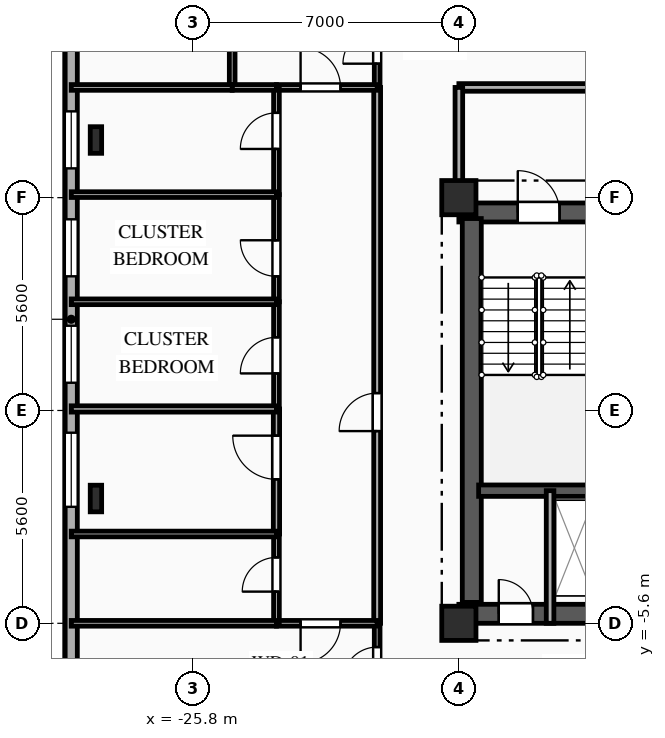
"""IFC4 building model, lengths in metres.
Left out: names, types, materials, properties, quantities, classifications, styles, units other than length and angle.
Written with IfcOpenShell. Run it as: python <this file> out.ifc"""

import sys

from ifc_helpers import new_model, si_unit, direction, frame, frame_2d, origin, origin_2d, place, context, subcontext, project, spatial, rectangle, i_section, extrude, element, fill, save


model = new_model("IFC4")
c1 = context("Model", 3, precision=1e-05, world=origin(), true_north=direction((0.0, 1.0)))
c2 = subcontext(c1, "Body", "Model", "MODEL_VIEW")
j1 = project(units=[si_unit("LENGTHUNIT", "METRE"), si_unit("PLANEANGLEUNIT", "RADIAN")], contexts=[c1])
p1 = place(None, origin())
s1 = spatial("IfcSite", under=j1, at=p1, CompositionType="ELEMENT")
p2 = place(p1, origin())
s2 = spatial("IfcBuilding", under=s1, at=p2, CompositionType="ELEMENT")
p3 = place(p2, frame((0.0, 0.0, 171.2)))
s3 = spatial("IfcBuildingStorey", under=s2, at=p3, CompositionType="ELEMENT", Elevation=171.2)
for number, where, z_axis, x_axis in (
    (1, (-18.8, -5.6, 0.0), (0.0, 0.0, 1.0), (1.0, 0.0, 0.0)),
    (2, (-18.8, 5.6, 0.0), (0.0, 0.0, 1.0), (1.0, 0.0, 0.0)),
):
    element("IfcColumn", number, at=place(p3, frame(where, z_axis=z_axis, x_axis=x_axis)), inside=s3, PredefinedType="COLUMN", context=c2, shape_type="SweptSolid", body=[
        extrude(rectangle(XDim=0.9, YDim=0.9, at=origin_2d()), origin(), (0.0, 0.0, 1.0), 3.35),
    ])
for number, where, z_axis, x_axis in (
    (3, (-28.35, 7.117, 0.0), (0.0, 0.0, 1.0), (1.0, 0.0, 0.0)),
    (4, (-28.35, -2.317, 0.0), (0.0, 0.0, 1.0), (1.0, 0.0, 0.0)),
):
    element("IfcColumn", number, at=place(p3, frame(where, z_axis=z_axis, x_axis=x_axis)), inside=s3, PredefinedType="COLUMN", context=c2, shape_type="SweptSolid", body=[
        extrude(i_section(OverallWidth=0.3, OverallDepth=0.7, WebThickness=0.017, FlangeThickness=0.032, FilletRadius=0.027, at=origin_2d()), origin(), (0.0, 0.0, 1.0), 3.35),
    ])
p4 = place(p3, frame((-29.0, -12.4, 0.0), z_axis=(0.0, 0.0, 1.0), x_axis=(0.0, 1.0, 0.0)))
e5 = element("IfcWall", 5, at=p4, inside=s3, PredefinedType="SOLIDWALL", context=c2, shape_type="SweptSolid", body=[
    extrude(rectangle(XDim=29.6, YDim=0.32, at=frame_2d((14.8, 0.0))), origin(), (0.0, 0.0, 1.0), 3.0),
])
p5 = place(p4, frame((2.855, 0.0, 0.85)))
e6 = element("IfcOpeningElement", 6, at=p5, cuts=e5, PredefinedType="OPENING", context=c2, shape_type="SweptSolid", body=[
    extrude(rectangle(XDim=1.65, YDim=1.85, at=frame_2d((0.825, 0.925))), frame((0.0, 0.17, 0.0), z_axis=(0.0, -1.0, 0.0), x_axis=(1.0, 0.0, 0.0)), (0.0, 0.0, 1.0), 0.34),
])
p6 = place(p4, frame((9.865, 0.0, 0.85)))
e7 = element("IfcOpeningElement", 7, at=p6, cuts=e5, PredefinedType="OPENING", context=c2, shape_type="SweptSolid", body=[
    extrude(rectangle(XDim=1.95, YDim=1.85, at=frame_2d((0.975, 0.925))), frame((0.0, 0.17, 0.0), z_axis=(0.0, -1.0, 0.0), x_axis=(1.0, 0.0, 0.0)), (0.0, 0.0, 1.0), 0.34),
])
p7 = place(p4, frame((13.13, 0.0, 0.85)))
e8 = element("IfcOpeningElement", 8, at=p7, cuts=e5, PredefinedType="OPENING", context=c2, shape_type="SweptSolid", body=[
    extrude(rectangle(XDim=1.5, YDim=1.85, at=frame_2d((0.75, 0.925))), frame((0.0, 0.17, 0.0), z_axis=(0.0, -1.0, 0.0), x_axis=(1.0, 0.0, 0.0)), (0.0, 0.0, 1.0), 0.34),
])
p8 = place(p4, frame((15.93, 0.0, 0.85)))
e9 = element("IfcOpeningElement", 9, at=p8, cuts=e5, PredefinedType="OPENING", context=c2, shape_type="SweptSolid", body=[
    extrude(rectangle(XDim=1.5, YDim=1.85, at=frame_2d((0.75, 0.925))), frame((0.0, 0.17, 0.0), z_axis=(0.0, -1.0, 0.0), x_axis=(1.0, 0.0, 0.0)), (0.0, 0.0, 1.0), 0.34),
])
p9 = place(p4, frame((18.77, 0.0, 0.85)))
e10 = element("IfcOpeningElement", 10, at=p9, cuts=e5, PredefinedType="OPENING", context=c2, shape_type="SweptSolid", body=[
    extrude(rectangle(XDim=1.5, YDim=1.85, at=frame_2d((0.75, 0.925))), frame((0.0, 0.17, 0.0), z_axis=(0.0, -1.0, 0.0), x_axis=(1.0, 0.0, 0.0)), (0.0, 0.0, 1.0), 0.34),
])
p10 = place(p4, frame((24.255, 0.0, 0.85)))
e11 = element("IfcOpeningElement", 11, at=p10, cuts=e5, PredefinedType="OPENING", context=c2, shape_type="SweptSolid", body=[
    extrude(rectangle(XDim=1.65, YDim=1.85, at=frame_2d((0.825, 0.925))), frame((0.0, 0.17, 0.0), z_axis=(0.0, -1.0, 0.0), x_axis=(1.0, 0.0, 0.0)), (0.0, 0.0, 1.0), 0.34),
])
p11 = place(p3, frame((-18.8, 5.21, 0.0), z_axis=(0.0, 0.0, 1.0), x_axis=(1.0, 0.0, 0.0)))
e12 = element("IfcWall", 12, at=p11, inside=s3, PredefinedType="SHEAR", context=c2, shape_type="SweptSolid", body=[
    extrude(rectangle(XDim=9.6, YDim=0.5, at=frame_2d((4.8, 0.0))), origin(), (0.0, 0.0, 1.0), 3.0),
])
p12 = place(p11, frame((1.55, 0.0, 0.0)))
e13 = element("IfcOpeningElement", 13, at=p12, cuts=e12, PredefinedType="OPENING", context=c2, shape_type="SweptSolid", body=[
    extrude(rectangle(XDim=1.1, YDim=2.15, at=frame_2d((0.55, 1.075))), frame((0.0, 0.26, 0.0), z_axis=(0.0, -1.0, 0.0), x_axis=(1.0, 0.0, 0.0)), (0.0, 0.0, 1.0), 0.52),
])
p13 = place(p11, frame((4.775, 0.0, 0.0)))
e14 = element("IfcOpeningElement", 14, at=p13, cuts=e12, PredefinedType="OPENING", context=c2, shape_type="SweptSolid", body=[
    extrude(rectangle(XDim=1.05, YDim=2.1, at=frame_2d((0.525, 1.05))), frame((0.0, 0.26, 0.0), z_axis=(0.0, -1.0, 0.0), x_axis=(1.0, 0.0, 0.0)), (0.0, 0.0, 1.0), 0.52),
])
p14 = place(p3, frame((-18.8, -5.35, 0.0), z_axis=(0.0, 0.0, 1.0), x_axis=(1.0, 0.0, 0.0)))
e15 = element("IfcWall", 15, at=p14, inside=s3, PredefinedType="SHEAR", context=c2, shape_type="SweptSolid", body=[
    extrude(rectangle(XDim=9.6, YDim=0.5, at=frame_2d((4.8, 0.0))), origin(), (0.0, 0.0, 1.0), 3.0),
])
p15 = place(p14, frame((1.05, 0.0, 0.0)))
e16 = element("IfcOpeningElement", 16, at=p15, cuts=e15, PredefinedType="OPENING", context=c2, shape_type="SweptSolid", body=[
    extrude(rectangle(XDim=0.9, YDim=2.1, at=frame_2d((0.45, 1.05))), frame((0.0, 0.26, 0.0), z_axis=(0.0, -1.0, 0.0), x_axis=(1.0, 0.0, 0.0)), (0.0, 0.0, 1.0), 0.52),
])
p16 = place(p3, frame((-18.46, -5.05, 0.0), z_axis=(0.0, 0.0, 1.0), x_axis=(0.0, 1.0, 0.0)))
e17 = element("IfcWall", 17, at=p16, inside=s3, PredefinedType="SHEAR", context=c2, shape_type="SweptSolid", body=[
    extrude(rectangle(XDim=10.1, YDim=0.5, at=frame_2d((5.05, 0.0))), origin(), (0.0, 0.0, 1.0), 3.0),
])
p17 = place(p3, frame((-18.28, -2.11, 0.0), z_axis=(0.0, 0.0, 1.0), x_axis=(1.0, 0.0, 0.0)))
e18 = element("IfcWall", 18, at=p17, inside=s3, PredefinedType="SHEAR", context=c2, shape_type="SweptSolid", body=[
    extrude(rectangle(XDim=3.18, YDim=0.3, at=frame_2d((1.59, 0.0))), origin(), (0.0, 0.0, 1.0), 3.0),
])
p18 = place(p3, frame((-16.4, -5.6, 0.0), z_axis=(0.0, 0.0, 1.0), x_axis=(0.0, 1.0, 0.0)))
e19 = element("IfcWall", 19, at=p18, inside=s3, PredefinedType="PARTITIONING", context=c2, shape_type="SweptSolid", body=[
    extrude(rectangle(XDim=3.49, YDim=0.2, at=frame_2d((1.745, 0.0))), origin(), (0.0, 0.0, 1.0), 3.0),
])
p19 = place(p3, frame((-12.0, 8.5, 0.0), z_axis=(0.0, 0.0, 1.0), x_axis=(-1.0, 0.0, 0.0)))
e20 = element("IfcWall", 20, at=p19, inside=s3, PredefinedType="PARTITIONING", context=c2, shape_type="SweptSolid", body=[
    extrude(rectangle(XDim=6.8, YDim=0.2, at=frame_2d((3.4, 0.0))), origin(), (0.0, 0.0, 1.0), 3.0),
])
p20 = place(p19, frame((1.715, 0.0, 0.0)))
e21 = element("IfcOpeningElement", 21, at=p20, cuts=e20, PredefinedType="OPENING", context=c2, shape_type="SweptSolid", body=[
    extrude(rectangle(XDim=1.1, YDim=2.15, at=frame_2d((0.55, 1.075))), frame((0.0, 0.11, 0.0), z_axis=(0.0, -1.0, 0.0), x_axis=(1.0, 0.0, 0.0)), (0.0, 0.0, 1.0), 0.22),
])
p21 = place(p3, frame((-18.8, 8.5, 0.0), z_axis=(0.0, 0.0, 1.0), x_axis=(0.0, -1.0, 0.0)))
e22 = element("IfcWall", 22, at=p21, inside=s3, PredefinedType="PARTITIONING", context=c2, shape_type="SweptSolid", body=[
    extrude(rectangle(XDim=2.9, YDim=0.2, at=frame_2d((1.45, 0.0))), origin(), (0.0, 0.0, 1.0), 2.485),
])
p22 = place(p3, frame((-20.95, 8.5, 0.0), z_axis=(0.0, 0.0, 1.0), x_axis=(0.0, 1.0, 0.0)))
e23 = element("IfcWall", 23, at=p22, inside=s3, PredefinedType="PARTITIONING", context=c2, shape_type="SweptSolid", body=[
    extrude(rectangle(XDim=2.15, YDim=0.15, at=frame_2d((1.075, 0.0))), origin(), (0.0, 0.0, 1.0), 3.0),
])
p23 = place(p22, frame((0.625, 0.0, 0.0)))
e24 = element("IfcOpeningElement", 24, at=p23, cuts=e23, PredefinedType="OPENING", context=c2, shape_type="SweptSolid", body=[
    extrude(rectangle(XDim=0.9, YDim=2.1, at=frame_2d((0.45, 1.05))), frame((0.0, 0.085, 0.0), z_axis=(0.0, -1.0, 0.0), x_axis=(1.0, 0.0, 0.0)), (0.0, 0.0, 1.0), 0.17),
])
p24 = place(p3, frame((-20.95, -7.75, 0.0), z_axis=(0.0, 0.0, 1.0), x_axis=(0.0, 1.0, 0.0)))
e25 = element("IfcWall", 25, at=p24, inside=s3, PredefinedType="PARTITIONING", context=c2, shape_type="SweptSolid", body=[
    extrude(rectangle(XDim=2.15, YDim=0.15, at=frame_2d((1.075, 0.0))), origin(), (0.0, 0.0, 1.0), 3.0),
])
p25 = place(p24, frame((0.625, 0.0, 0.0)))
e26 = element("IfcOpeningElement", 26, at=p25, cuts=e25, PredefinedType="OPENING", context=c2, shape_type="SweptSolid", body=[
    extrude(rectangle(XDim=0.9, YDim=2.1, at=frame_2d((0.45, 1.05))), frame((0.0, 0.085, 0.0), z_axis=(0.0, -1.0, 0.0), x_axis=(1.0, 0.0, 0.0)), (0.0, 0.0, 1.0), 0.17),
])
p26 = place(p3, frame((-20.95, -5.6, 0.0), z_axis=(0.0, 0.0, 1.0), x_axis=(0.0, 1.0, 0.0)))
e27 = element("IfcWall", 27, at=p26, inside=s3, PredefinedType="PARTITIONING", context=c2, shape_type="SweptSolid", body=[
    extrude(rectangle(XDim=14.1, YDim=0.18, at=frame_2d((7.05, 0.0))), origin(), (0.0, 0.0, 1.0), 3.0),
])
p27 = place(p26, frame((5.058, 0.0, 0.0)))
e28 = element("IfcOpeningElement", 28, at=p27, cuts=e27, PredefinedType="OPENING", context=c2, shape_type="SweptSolid", body=[
    extrude(rectangle(XDim=1.0, YDim=2.15, at=frame_2d((0.5, 1.075))), frame((0.0, 0.1, 0.0), z_axis=(0.0, -1.0, 0.0), x_axis=(1.0, 0.0, 0.0)), (0.0, 0.0, 1.0), 0.2),
])
p28 = place(p3, frame((-23.6, 8.5, 0.0), z_axis=(0.0, 0.0, 1.0), x_axis=(1.0, 0.0, 0.0)))
e29 = element("IfcWall", 29, at=p28, inside=s3, PredefinedType="PARTITIONING", context=c2, shape_type="SweptSolid", body=[
    extrude(rectangle(XDim=2.65, YDim=0.15, at=frame_2d((1.325, 0.0))), origin(), (0.0, 0.0, 1.0), 3.0),
])
p29 = place(p28, frame((0.635, 0.0, 0.0)))
e30 = element("IfcOpeningElement", 30, at=p29, cuts=e29, PredefinedType="OPENING", context=c2, shape_type="SweptSolid", body=[
    extrude(rectangle(XDim=1.05, YDim=2.15, at=frame_2d((0.525, 1.075))), frame((0.0, 0.085, 0.0), z_axis=(0.0, -1.0, 0.0), x_axis=(1.0, 0.0, 0.0)), (0.0, 0.0, 1.0), 0.17),
])
p30 = place(p3, frame((-20.95, -5.6, 0.0), z_axis=(0.0, 0.0, 1.0), x_axis=(-1.0, 0.0, 0.0)))
e31 = element("IfcWall", 31, at=p30, inside=s3, PredefinedType="PARTITIONING", context=c2, shape_type="SweptSolid", body=[
    extrude(rectangle(XDim=2.65, YDim=0.15, at=frame_2d((1.325, 0.0))), origin(), (0.0, 0.0, 1.0), 3.0),
])
p31 = place(p30, frame((0.965, 0.0, 0.0)))
e32 = element("IfcOpeningElement", 32, at=p31, cuts=e31, PredefinedType="OPENING", context=c2, shape_type="SweptSolid", body=[
    extrude(rectangle(XDim=1.05, YDim=2.15, at=frame_2d((0.525, 1.075))), frame((0.0, 0.085, 0.0), z_axis=(0.0, -1.0, 0.0), x_axis=(1.0, 0.0, 0.0)), (0.0, 0.0, 1.0), 0.17),
])
p32 = place(p3, frame((-23.6, -5.6, 0.0), z_axis=(0.0, 0.0, 1.0), x_axis=(0.0, 1.0, 0.0)))
e33 = element("IfcWall", 33, at=p32, inside=s3, PredefinedType="PLUMBINGWALL", context=c2, shape_type="SweptSolid", body=[
    extrude(rectangle(XDim=2.35, YDim=0.15, at=frame_2d((1.175, 0.0))), origin(), (0.0, 0.0, 1.0), 2.655),
])
p33 = place(p32, frame((0.834, 0.0, 0.0)))
e34 = element("IfcOpeningElement", 34, at=p33, cuts=e33, PredefinedType="OPENING", context=c2, shape_type="SweptSolid", body=[
    extrude(rectangle(XDim=0.9, YDim=2.1, at=frame_2d((0.45, 1.05))), frame((0.0, 0.085, 0.0), z_axis=(0.0, -1.0, 0.0), x_axis=(1.0, 0.0, 0.0)), (0.0, 0.0, 1.0), 0.17),
])
p34 = place(p3, frame((-23.6, -3.25, 0.0), z_axis=(0.0, 0.0, 1.0), x_axis=(0.0, 1.0, 0.0)))
e35 = element("IfcWall", 35, at=p34, inside=s3, PredefinedType="PARTITIONING", context=c2, shape_type="SweptSolid", body=[
    extrude(rectangle(XDim=3.29, YDim=0.165, at=frame_2d((1.645, 0.0))), origin(), (0.0, 0.0, 1.0), 2.655),
])
p35 = place(p34, frame((1.438, 0.0, 0.0)))
e36 = element("IfcOpeningElement", 36, at=p35, cuts=e35, PredefinedType="OPENING", context=c2, shape_type="SweptSolid", body=[
    extrude(rectangle(XDim=1.15, YDim=2.15, at=frame_2d((0.575, 1.075))), frame((0.0, 0.093, 0.0), z_axis=(0.0, -1.0, 0.0), x_axis=(1.0, 0.0, 0.0)), (0.0, 0.0, 1.0), 0.185),
])
p36 = place(p3, frame((-23.6, 0.04, 0.0), z_axis=(0.0, 0.0, 1.0), x_axis=(0.0, 1.0, 0.0)))
e37 = element("IfcWall", 37, at=p36, inside=s3, PredefinedType="PARTITIONING", context=c2, shape_type="SweptSolid", body=[
    extrude(rectangle(XDim=2.82, YDim=0.15, at=frame_2d((1.41, 0.0))), origin(), (0.0, 0.0, 1.0), 2.655),
])
p37 = place(p36, frame((0.935, 0.0, 0.0)))
e38 = element("IfcOpeningElement", 38, at=p37, cuts=e37, PredefinedType="OPENING", context=c2, shape_type="SweptSolid", body=[
    extrude(rectangle(XDim=0.95, YDim=2.1, at=frame_2d((0.475, 1.05))), frame((0.0, 0.085, 0.0), z_axis=(0.0, -1.0, 0.0), x_axis=(1.0, 0.0, 0.0)), (0.0, 0.0, 1.0), 0.17),
])
p38 = place(p3, frame((-23.6, 2.86, 0.0), z_axis=(0.0, 0.0, 1.0), x_axis=(0.0, 1.0, 0.0)))
e39 = element("IfcWall", 39, at=p38, inside=s3, PredefinedType="PARTITIONING", context=c2, shape_type="SweptSolid", body=[
    extrude(rectangle(XDim=2.82, YDim=0.15, at=frame_2d((1.41, 0.0))), origin(), (0.0, 0.0, 1.0), 2.655),
])
p39 = place(p38, frame((0.669, 0.0, 0.0)))
e40 = element("IfcOpeningElement", 40, at=p39, cuts=e39, PredefinedType="OPENING", context=c2, shape_type="SweptSolid", body=[
    extrude(rectangle(XDim=0.95, YDim=2.1, at=frame_2d((0.475, 1.05))), frame((0.0, 0.085, 0.0), z_axis=(0.0, -1.0, 0.0), x_axis=(1.0, 0.0, 0.0)), (0.0, 0.0, 1.0), 0.17),
])
p40 = place(p3, frame((-23.6, 5.68, 0.0), z_axis=(0.0, 0.0, 1.0), x_axis=(0.0, 1.0, 0.0)))
e41 = element("IfcWall", 41, at=p40, inside=s3, PredefinedType="PARTITIONING", context=c2, shape_type="SweptSolid", body=[
    extrude(rectangle(XDim=2.82, YDim=0.15, at=frame_2d((1.41, 0.0))), origin(), (0.0, 0.0, 1.0), 2.655),
])
p41 = place(p40, frame((1.201, 0.0, 0.0)))
e42 = element("IfcOpeningElement", 42, at=p41, cuts=e41, PredefinedType="OPENING", context=c2, shape_type="SweptSolid", body=[
    extrude(rectangle(XDim=0.95, YDim=2.1, at=frame_2d((0.475, 1.05))), frame((0.0, 0.085, 0.0), z_axis=(0.0, -1.0, 0.0), x_axis=(1.0, 0.0, 0.0)), (0.0, 0.0, 1.0), 0.17),
])
p42 = place(p3, frame((-24.765, 8.5, 0.0), z_axis=(0.0, 0.0, 1.0), x_axis=(0.0, 1.0, 0.0)))
e43 = element("IfcWall", 43, at=p42, inside=s3, PredefinedType="PARTITIONING", context=c2, shape_type="SweptSolid", body=[
    extrude(rectangle(XDim=11.9, YDim=0.15, at=frame_2d((5.95, 0.0))), origin(), (0.0, 0.0, 1.0), 3.0),
])
p43 = place(p42, frame((3.002, 0.0, 0.0)))
e44 = element("IfcOpeningElement", 44, at=p43, cuts=e43, PredefinedType="OPENING", context=c2, shape_type="SweptSolid", body=[
    extrude(rectangle(XDim=1.05, YDim=2.15, at=frame_2d((0.525, 1.075))), frame((0.0, 0.085, 0.0), z_axis=(0.0, -1.0, 0.0), x_axis=(1.0, 0.0, 0.0)), (0.0, 0.0, 1.0), 0.17),
])
p44 = place(p3, frame((-23.6, 8.5, 0.0), z_axis=(0.0, 0.0, 1.0), x_axis=(-1.0, 0.0, 0.0)))
e45 = element("IfcWall", 45, at=p44, inside=s3, PredefinedType="PARTITIONING", context=c2, shape_type="SweptSolid", body=[
    extrude(rectangle(XDim=1.165, YDim=0.15, at=frame_2d((0.583, 0.0))), origin(), (0.0, 0.0, 1.0), 3.0),
])
p45 = place(p3, frame((-24.765, 8.5, 0.0), z_axis=(0.0, 0.0, 1.0), x_axis=(-1.0, 0.0, 0.0)))
e46 = element("IfcWall", 46, at=p45, inside=s3, PredefinedType="PARTITIONING", context=c2, shape_type="SweptSolid", body=[
    extrude(rectangle(XDim=4.235, YDim=0.15, at=frame_2d((2.118, 0.0))), origin(), (0.0, 0.0, 1.0), 3.0),
])
for number, where, z_axis, x_axis in (
    (47, (-29.0, -5.6, 0.0), (0.0, 0.0, 1.0), (1.0, 0.0, 0.0)),
    (48, (-29.0, -3.25, 0.0), (0.0, 0.0, 1.0), (1.0, 0.0, 0.0)),
):
    element("IfcWall", number, at=place(p3, frame(where, z_axis=z_axis, x_axis=x_axis)), inside=s3, PredefinedType="PLUMBINGWALL", context=c2, shape_type="SweptSolid", body=[
        extrude(rectangle(XDim=5.4, YDim=0.15, at=frame_2d((2.7, 0.0))), origin(), (0.0, 0.0, 1.0), 3.0),
    ])
p46 = place(p3, frame((-29.0, 0.04, 0.0), z_axis=(0.0, 0.0, 1.0), x_axis=(1.0, 0.0, 0.0)))
e49 = element("IfcWall", 49, at=p46, inside=s3, PredefinedType="PARTITIONING", context=c2, shape_type="SweptSolid", body=[
    extrude(rectangle(XDim=5.4, YDim=0.165, at=frame_2d((2.7, 0.0))), origin(), (0.0, 0.0, 1.0), 3.0),
])
for number, where, z_axis, x_axis in (
    (50, (-29.0, 2.86, 0.0), (0.0, 0.0, 1.0), (1.0, 0.0, 0.0)),
    (51, (-29.0, 5.68, 0.0), (0.0, 0.0, 1.0), (1.0, 0.0, 0.0)),
):
    element("IfcWall", number, at=place(p3, frame(where, z_axis=z_axis, x_axis=x_axis)), inside=s3, PredefinedType="PARTITIONING", context=c2, shape_type="SweptSolid", body=[
        extrude(rectangle(XDim=5.4, YDim=0.15, at=frame_2d((2.7, 0.0))), origin(), (0.0, 0.0, 1.0), 3.0),
    ])
p47 = place(p6, origin())
e52 = element("IfcWindow", 52, at=p47, inside=s3, PartitioningType="SINGLE_PANEL", PredefinedType="WINDOW", context=c2, shape_type="SweptSolid", body=[
    extrude(rectangle(XDim=1.95, YDim=1.85, at=frame_2d((0.975, 0.925))), frame((0.0, 0.03, 0.0), z_axis=(0.0, -1.0, 0.0), x_axis=(1.0, 0.0, 0.0)), (0.0, 0.0, 1.0), 0.06),
])
fill(e7, e52)
p48 = place(p7, origin())
e53 = element("IfcWindow", 53, at=p48, inside=s3, PartitioningType="SINGLE_PANEL", PredefinedType="WINDOW", context=c2, shape_type="SweptSolid", body=[
    extrude(rectangle(XDim=1.5, YDim=1.85, at=frame_2d((0.75, 0.925))), frame((0.0, 0.03, 0.0), z_axis=(0.0, -1.0, 0.0), x_axis=(1.0, 0.0, 0.0)), (0.0, 0.0, 1.0), 0.06),
])
fill(e8, e53)
p49 = place(p8, origin())
e54 = element("IfcWindow", 54, at=p49, inside=s3, PartitioningType="SINGLE_PANEL", PredefinedType="WINDOW", context=c2, shape_type="SweptSolid", body=[
    extrude(rectangle(XDim=1.5, YDim=1.85, at=frame_2d((0.75, 0.925))), frame((0.0, 0.03, 0.0), z_axis=(0.0, -1.0, 0.0), x_axis=(1.0, 0.0, 0.0)), (0.0, 0.0, 1.0), 0.06),
])
fill(e9, e54)
p50 = place(p9, origin())
e55 = element("IfcWindow", 55, at=p50, inside=s3, PartitioningType="SINGLE_PANEL", PredefinedType="WINDOW", context=c2, shape_type="SweptSolid", body=[
    extrude(rectangle(XDim=1.5, YDim=1.85, at=frame_2d((0.75, 0.925))), frame((0.0, 0.03, 0.0), z_axis=(0.0, -1.0, 0.0), x_axis=(1.0, 0.0, 0.0)), (0.0, 0.0, 1.0), 0.06),
])
fill(e10, e55)
p51 = place(p12, origin())
e56 = element("IfcDoor", 56, at=p51, inside=s3, OperationType="SINGLE_SWING_LEFT", PredefinedType="DOOR", context=c2, shape_type="SweptSolid", body=[
    extrude(rectangle(XDim=1.1, YDim=2.15, at=frame_2d((0.55, 1.075))), frame((0.0, 0.025, 0.0), z_axis=(0.0, -1.0, 0.0), x_axis=(1.0, 0.0, 0.0)), (0.0, 0.0, 1.0), 0.05),
])
fill(e13, e56)
p52 = place(p15, origin())
e57 = element("IfcDoor", 57, at=p52, inside=s3, OperationType="SINGLE_SWING_LEFT", PredefinedType="DOOR", context=c2, shape_type="SweptSolid", body=[
    extrude(rectangle(XDim=0.9, YDim=2.1, at=frame_2d((0.45, 1.05))), frame((0.0, 0.025, 0.0), z_axis=(0.0, -1.0, 0.0), x_axis=(1.0, 0.0, 0.0)), (0.0, 0.0, 1.0), 0.05),
])
fill(e16, e57)
p53 = place(p23, origin())
e58 = element("IfcDoor", 58, at=p53, inside=s3, OperationType="SINGLE_SWING_LEFT", PredefinedType="DOOR", context=c2, shape_type="SweptSolid", body=[
    extrude(rectangle(XDim=0.9, YDim=2.1, at=frame_2d((0.45, 1.05))), frame((0.0, 0.025, 0.0), z_axis=(0.0, -1.0, 0.0), x_axis=(1.0, 0.0, 0.0)), (0.0, 0.0, 1.0), 0.05),
])
fill(e24, e58)
p54 = place(p25, origin())
e59 = element("IfcDoor", 59, at=p54, inside=s3, OperationType="SINGLE_SWING_LEFT", PredefinedType="DOOR", context=c2, shape_type="SweptSolid", body=[
    extrude(rectangle(XDim=0.9, YDim=2.1, at=frame_2d((0.45, 1.05))), frame((0.0, 0.025, 0.0), z_axis=(0.0, -1.0, 0.0), x_axis=(1.0, 0.0, 0.0)), (0.0, 0.0, 1.0), 0.05),
])
fill(e26, e59)
p55 = place(p27, origin())
e60 = element("IfcDoor", 60, at=p55, inside=s3, OperationType="SINGLE_SWING_LEFT", PredefinedType="DOOR", context=c2, shape_type="SweptSolid", body=[
    extrude(rectangle(XDim=1.0, YDim=2.15, at=frame_2d((0.5, 1.075))), frame((0.0, 0.025, 0.0), z_axis=(0.0, -1.0, 0.0), x_axis=(1.0, 0.0, 0.0)), (0.0, 0.0, 1.0), 0.05),
])
fill(e28, e60)
p56 = place(p29, origin())
e61 = element("IfcDoor", 61, at=p56, inside=s3, OperationType="SINGLE_SWING_LEFT", PredefinedType="DOOR", context=c2, shape_type="SweptSolid", body=[
    extrude(rectangle(XDim=1.05, YDim=2.15, at=frame_2d((0.525, 1.075))), frame((0.0, 0.025, 0.0), z_axis=(0.0, -1.0, 0.0), x_axis=(1.0, 0.0, 0.0)), (0.0, 0.0, 1.0), 0.05),
])
fill(e30, e61)
p57 = place(p31, origin())
e62 = element("IfcDoor", 62, at=p57, inside=s3, OperationType="SINGLE_SWING_RIGHT", PredefinedType="DOOR", context=c2, shape_type="SweptSolid", body=[
    extrude(rectangle(XDim=1.05, YDim=2.15, at=frame_2d((0.525, 1.075))), frame((0.0, 0.025, 0.0), z_axis=(0.0, -1.0, 0.0), x_axis=(1.0, 0.0, 0.0)), (0.0, 0.0, 1.0), 0.05),
])
fill(e32, e62)
p58 = place(p33, origin())
e63 = element("IfcDoor", 63, at=p58, inside=s3, OperationType="SINGLE_SWING_LEFT", PredefinedType="DOOR", context=c2, shape_type="SweptSolid", body=[
    extrude(rectangle(XDim=0.9, YDim=2.1, at=frame_2d((0.45, 1.05))), frame((0.0, 0.025, 0.0), z_axis=(0.0, -1.0, 0.0), x_axis=(1.0, 0.0, 0.0)), (0.0, 0.0, 1.0), 0.05),
])
fill(e34, e63)
p59 = place(p35, origin())
e64 = element("IfcDoor", 64, at=p59, inside=s3, OperationType="SINGLE_SWING_RIGHT", PredefinedType="DOOR", context=c2, shape_type="SweptSolid", body=[
    extrude(rectangle(XDim=1.15, YDim=2.15, at=frame_2d((0.575, 1.075))), frame((0.0, 0.025, 0.0), z_axis=(0.0, -1.0, 0.0), x_axis=(1.0, 0.0, 0.0)), (0.0, 0.0, 1.0), 0.05),
])
fill(e36, e64)
p60 = place(p37, origin())
e65 = element("IfcDoor", 65, at=p60, inside=s3, OperationType="SINGLE_SWING_LEFT", PredefinedType="DOOR", context=c2, shape_type="SweptSolid", body=[
    extrude(rectangle(XDim=0.95, YDim=2.1, at=frame_2d((0.475, 1.05))), frame((0.0, 0.025, 0.0), z_axis=(0.0, -1.0, 0.0), x_axis=(1.0, 0.0, 0.0)), (0.0, 0.0, 1.0), 0.05),
])
fill(e38, e65)
p61 = place(p39, origin())
e66 = element("IfcDoor", 66, at=p61, inside=s3, OperationType="SINGLE_SWING_RIGHT", PredefinedType="DOOR", context=c2, shape_type="SweptSolid", body=[
    extrude(rectangle(XDim=0.95, YDim=2.1, at=frame_2d((0.475, 1.05))), frame((0.0, 0.025, 0.0), z_axis=(0.0, -1.0, 0.0), x_axis=(1.0, 0.0, 0.0)), (0.0, 0.0, 1.0), 0.05),
])
fill(e40, e66)
p62 = place(p41, origin())
e67 = element("IfcDoor", 67, at=p62, inside=s3, OperationType="SINGLE_SWING_LEFT", PredefinedType="DOOR", context=c2, shape_type="SweptSolid", body=[
    extrude(rectangle(XDim=0.95, YDim=2.1, at=frame_2d((0.475, 1.05))), frame((0.0, 0.025, 0.0), z_axis=(0.0, -1.0, 0.0), x_axis=(1.0, 0.0, 0.0)), (0.0, 0.0, 1.0), 0.05),
])
fill(e42, e67)
save(model, sys.argv[1])
